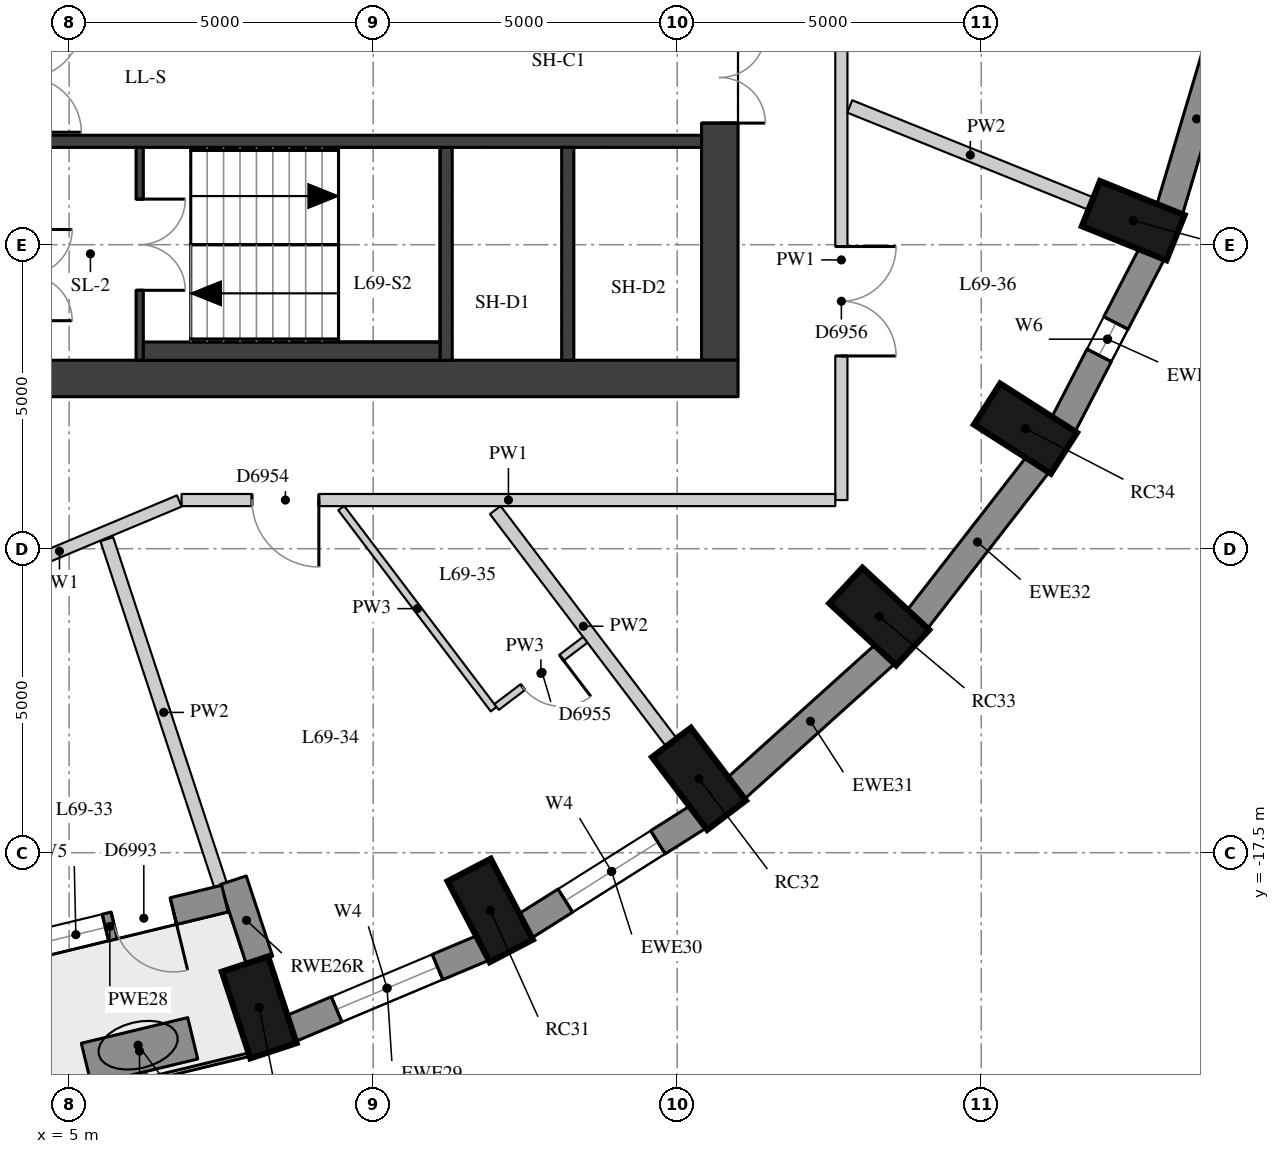
"""IFC4 building model, lengths in metres.
Left out: names, types, materials, properties, quantities, classifications, styles, units other than length and angle.
Written with IfcOpenShell. Run it as: python <this file> out.ifc"""

import sys

from ifc_helpers import new_model, si_unit, direction, frame, frame_2d, origin, origin_2d, place, context, subcontext, project, spatial, rectangle, extrude, element, fill, save


model = new_model("IFC4")
c1 = context("Model", 3, precision=1e-05, world=origin(), true_north=direction((0.0, 1.0)))
c2 = subcontext(c1, "Body", "Model", "MODEL_VIEW")
j1 = project(units=[si_unit("LENGTHUNIT", "METRE"), si_unit("PLANEANGLEUNIT", "RADIAN")], contexts=[c1])
p1 = place(None, origin())
s1 = spatial("IfcSite", under=j1, at=p1, CompositionType="ELEMENT")
p2 = place(p1, origin())
s2 = spatial("IfcBuilding", under=s1, at=p2, CompositionType="ELEMENT")
p3 = place(p2, frame((0.0, 0.0, 243.2)))
s3 = spatial("IfcBuildingStorey", under=s2, at=p3, CompositionType="ELEMENT", Elevation=243.2)
for number, where, z_axis, x_axis in (
    (1, (8.125, -20.044, 0.0), (0.0, 0.0, 1.0), (0.312, -0.95, 0.0)),
    (2, (11.925, -18.449, 0.0), (0.0, 0.0, 1.0), (0.462, -0.887, 0.0)),
    (3, (15.359, -16.285, 0.0), (0.0, 0.0, 1.0), (0.604, -0.797, 0.0)),
    (4, (18.323, -13.616, 0.0), (0.0, 0.0, 1.0), (0.733, -0.681, 0.0)),
    (5, (20.728, -10.525, 0.0), (0.0, 0.0, 1.0), (0.843, -0.539, 0.0)),
    (6, (22.5, -7.105, 0.0), (0.0, 0.0, 1.0), (0.928, -0.374, 0.0)),
):
    element("IfcColumn", number, at=place(p3, frame(where, z_axis=z_axis, x_axis=x_axis)), inside=s3, PredefinedType="COLUMN", context=c2, shape_type="SweptSolid", body=[
        extrude(rectangle(XDim=1.5, YDim=0.8, at=origin_2d()), origin(), (0.0, 0.0, 1.0), 3.3),
    ])
p4 = place(p3, frame((8.641, -20.395, 0.0), z_axis=(0.0, 0.0, 1.0), x_axis=(0.922049934692, 0.3870709469, 0.0)))
e7 = element("IfcWall", 7, at=p4, inside=s3, PredefinedType="SOLIDWALL", context=c2, shape_type="SweptSolid", body=[
    extrude(rectangle(XDim=3.443, YDim=0.45, at=frame_2d((1.722, 0.0))), origin(), (0.0, 0.0, 1.0), 3.02),
])
p5 = place(p4, frame((0.822, 0.0, 0.4)))
e8 = element("IfcOpeningElement", 8, at=p5, cuts=e7, PredefinedType="OPENING", context=c2, shape_type="SweptSolid", body=[
    extrude(rectangle(XDim=1.8, YDim=1.75, at=frame_2d((0.9, 0.875))), frame((0.0, 0.235, 0.0), z_axis=(0.0, -1.0, 0.0), x_axis=(1.0, 0.0, 0.0)), (0.0, 0.0, 1.0), 0.47),
])
p6 = place(p3, frame((12.49, -18.711, 0.0), z_axis=(0.0, 0.0, 1.0), x_axis=(0.845929139811, 0.53329531258, 0.0)))
e9 = element("IfcWall", 9, at=p6, inside=s3, PredefinedType="SOLIDWALL", context=c2, shape_type="SweptSolid", body=[
    extrude(rectangle(XDim=3.385, YDim=0.45, at=frame_2d((1.692, 0.0))), origin(), (0.0, 0.0, 1.0), 3.02),
])
p7 = place(p6, frame((0.792, 0.0, 0.4)))
e10 = element("IfcOpeningElement", 10, at=p7, cuts=e9, PredefinedType="OPENING", context=c2, shape_type="SweptSolid", body=[
    extrude(rectangle(XDim=1.8, YDim=1.75, at=frame_2d((0.9, 0.875))), frame((0.0, 0.235, 0.0), z_axis=(0.0, -1.0, 0.0), x_axis=(1.0, 0.0, 0.0)), (0.0, 0.0, 1.0), 0.47),
])
p8 = place(p3, frame((15.959, -16.448, 0.0), z_axis=(0.0, 0.0, 1.0), x_axis=(0.743166014219, 0.669107073128, 0.0)))
e11 = element("IfcWall", 11, at=p8, inside=s3, PredefinedType="SOLIDWALL", context=c2, shape_type="SweptSolid", body=[
    extrude(rectangle(XDim=3.316, YDim=0.45, at=frame_2d((1.658, 0.0))), origin(), (0.0, 0.0, 1.0), 3.02),
])
p9 = place(p3, frame((18.942, -13.672, 0.0), z_axis=(0.0, 0.0, 1.0), x_axis=(0.613898970825, 0.789384604372, 0.0)))
e12 = element("IfcWall", 12, at=p9, inside=s3, PredefinedType="SOLIDWALL", context=c2, shape_type="SweptSolid", body=[
    extrude(rectangle(XDim=3.247, YDim=0.45, at=frame_2d((1.624, 0.0))), origin(), (0.0, 0.0, 1.0), 3.02),
])
p10 = place(p3, frame((21.345, -10.468, 0.0), z_axis=(0.0, 0.0, 1.0), x_axis=(0.459921155255, 0.887959757505, 0.0)))
e13 = element("IfcWall", 13, at=p10, inside=s3, PredefinedType="SOLIDWALL", context=c2, shape_type="SweptSolid", body=[
    extrude(rectangle(XDim=3.186, YDim=0.45, at=frame_2d((1.593, 0.0))), origin(), (0.0, 0.0, 1.0), 3.02),
])
p11 = place(p10, frame((1.293, 0.0, 0.4)))
e14 = element("IfcOpeningElement", 14, at=p11, cuts=e13, PredefinedType="OPENING", context=c2, shape_type="SweptSolid", body=[
    extrude(rectangle(XDim=0.6, YDim=1.75, at=frame_2d((0.3, 0.875))), frame((0.0, 0.235, 0.0), z_axis=(0.0, -1.0, 0.0), x_axis=(1.0, 0.0, 0.0)), (0.0, 0.0, 1.0), 0.47),
])
p12 = place(p3, frame((23.094, -6.935, 0.0), z_axis=(0.0, 0.0, 1.0), x_axis=(0.285263800865, 0.958449040855, 0.0)))
e15 = element("IfcWall", 15, at=p12, inside=s3, PredefinedType="SOLIDWALL", context=c2, shape_type="SweptSolid", body=[
    extrude(rectangle(XDim=3.139, YDim=0.45, at=frame_2d((1.57, 0.0))), origin(), (0.0, 0.0, 1.0), 3.02),
])
p13 = place(p3, frame((8.134, -19.273, 0.0), z_axis=(0.0, 0.0, 1.0), x_axis=(-0.312379684595, 0.949957332017, 0.0)))
e16 = element("IfcWall", 16, at=p13, inside=s3, PredefinedType="SOLIDWALL", context=c2, shape_type="SweptSolid", body=[
    extrude(rectangle(XDim=1.39, YDim=0.45, at=frame_2d((0.695, 0.0))), origin(), (0.0, 0.0, 1.0), 3.02),
])
p14 = place(p3, frame((3.776, -19.171, 0.0), z_axis=(0.0, 0.0, 1.0), x_axis=(0.971940055516, 0.235228672751, 0.0)))
e17 = element("IfcWall", 17, at=p14, inside=s3, PredefinedType="SOLIDWALL", context=c2, shape_type="SweptSolid", body=[
    extrude(rectangle(XDim=3.895, YDim=0.45, at=frame_2d((1.948, 0.0))), origin(), (0.0, 0.0, 1.0), 3.02),
])
p15 = place(p14, frame((0.873, 0.0, 0.4)))
e18 = element("IfcOpeningElement", 18, at=p15, cuts=e17, PredefinedType="OPENING", context=c2, shape_type="SweptSolid", body=[
    extrude(rectangle(XDim=1.0, YDim=1.75, at=frame_2d((0.5, 0.875))), frame((0.0, 0.235, 0.0), z_axis=(0.0, -1.0, 0.0), x_axis=(1.0, 0.0, 0.0)), (0.0, 0.0, 1.0), 0.47),
])
p16 = place(p14, frame((2.023, 0.0, 0.0)))
e19 = element("IfcOpeningElement", 19, at=p16, cuts=e17, PredefinedType="OPENING", context=c2, shape_type="SweptSolid", body=[
    extrude(rectangle(XDim=1.0, YDim=2.15, at=frame_2d((0.5, 1.075))), frame((0.0, 0.235, 0.0), z_axis=(0.0, -1.0, 0.0), x_axis=(1.0, 0.0, 0.0)), (0.0, 0.0, 1.0), 0.47),
])
p17 = place(p3, frame((5.282, -20.975, 0.0), z_axis=(0.0, 0.0, 1.0), x_axis=(0.972112071369, 0.234516781275, 0.0)))
e20 = element("IfcWall", 20, at=p17, inside=s3, PredefinedType="USERDEFINED", context=c2, shape_type="SweptSolid", body=[
    extrude(rectangle(XDim=1.8, YDim=0.7, at=frame_2d((0.9, 0.0))), origin(), (0.0, 0.0, 1.0), 0.75),
])
p18 = place(p3, frame((15.7, -9.4, 0.0), z_axis=(0.0, 0.0, 1.0), x_axis=(0.0, 1.0, 0.0)))
e21 = element("IfcWall", 21, at=p18, inside=s3, PredefinedType="SHEAR", context=c2, shape_type="SweptSolid", body=[
    extrude(rectangle(XDim=18.8, YDim=0.6, at=frame_2d((9.4, 0.0))), origin(), (0.0, 0.0, 1.0), 3.02),
])
p19 = place(p18, frame((13.4, 0.0, 0.0)))
e22 = element("IfcOpeningElement", 22, at=p19, cuts=e21, PredefinedType="OPENING", context=c2, shape_type="SweptSolid", body=[
    extrude(rectangle(XDim=1.5, YDim=2.1, at=frame_2d((0.75, 1.05))), frame((0.0, 0.31, 0.0), z_axis=(0.0, -1.0, 0.0), x_axis=(1.0, 0.0, 0.0)), (0.0, 0.0, 1.0), 0.62),
])
p20 = place(p18, frame((3.9, 0.0, 0.0)))
e23 = element("IfcOpeningElement", 23, at=p20, cuts=e21, PredefinedType="OPENING", context=c2, shape_type="SweptSolid", body=[
    extrude(rectangle(XDim=1.5, YDim=2.1, at=frame_2d((0.75, 1.05))), frame((0.0, 0.31, 0.0), z_axis=(0.0, -1.0, 0.0), x_axis=(1.0, 0.0, 0.0)), (0.0, 0.0, 1.0), 0.62),
])
p21 = place(p3, frame((4.0, -9.7, 0.0), z_axis=(0.0, 0.0, 1.0), x_axis=(1.0, 0.0, 0.0)))
e24 = element("IfcWall", 24, at=p21, inside=s3, PredefinedType="SHEAR", context=c2, shape_type="SweptSolid", body=[
    extrude(rectangle(XDim=12.0, YDim=0.6, at=frame_2d((6.0, 0.0))), origin(), (0.0, 0.0, 1.0), 3.02),
])
p22 = place(p3, frame((4.6, -5.8, 0.0), z_axis=(0.0, 0.0, 1.0), x_axis=(1.0, 0.0, 0.0)))
e25 = element("IfcWall", 25, at=p22, inside=s3, PredefinedType="SHEAR", context=c2, shape_type="SweptSolid", body=[
    extrude(rectangle(XDim=10.8, YDim=0.2, at=frame_2d((5.4, 0.0))), origin(), (0.0, 0.0, 1.0), 3.02),
])
for number, where, z_axis, x_axis in (
    (26, (11.2, -9.4, 0.0), (0.0, 0.0, 1.0), (0.0, 1.0, 0.0)),
    (27, (13.2, -9.4, 0.0), (0.0, 0.0, 1.0), (0.0, 1.0, 0.0)),
):
    element("IfcWall", number, at=place(p3, frame(where, z_axis=z_axis, x_axis=x_axis)), inside=s3, PredefinedType="SHEAR", context=c2, shape_type="SweptSolid", body=[
        extrude(rectangle(XDim=3.5, YDim=0.2, at=frame_2d((1.75, 0.0))), origin(), (0.0, 0.0, 1.0), 3.02),
    ])
p23 = place(p3, frame((6.16, -9.4, 0.0), z_axis=(0.0, 0.0, 1.0), x_axis=(0.0, 1.0, 0.0)))
e28 = element("IfcWall", 28, at=p23, inside=s3, PredefinedType="SHEAR", context=c2, shape_type="SweptSolid", body=[
    extrude(rectangle(XDim=3.5, YDim=0.12, at=frame_2d((1.75, 0.0))), origin(), (0.0, 0.0, 1.0), 3.02),
])
p24 = place(p23, frame((1.15, 0.0, 0.0)))
e29 = element("IfcOpeningElement", 29, at=p24, cuts=e28, PredefinedType="OPENING", context=c2, shape_type="SweptSolid", body=[
    extrude(rectangle(XDim=1.5, YDim=2.1, at=frame_2d((0.75, 1.05))), frame((0.0, 0.07, 0.0), z_axis=(0.0, -1.0, 0.0), x_axis=(1.0, 0.0, 0.0)), (0.0, 0.0, 1.0), 0.14),
])
p25 = place(p3, frame((6.22, -9.25, 0.0), z_axis=(0.0, 0.0, 1.0), x_axis=(1.0, 0.0, 0.0)))
e30 = element("IfcWall", 30, at=p25, inside=s3, PredefinedType="PARTITIONING", context=c2, shape_type="SweptSolid", body=[
    extrude(rectangle(XDim=4.88, YDim=0.3, at=frame_2d((2.44, 0.0))), origin(), (0.0, 0.0, 1.0), 3.02),
])
p26 = place(p3, frame((17.7, -3.8, 0.0), z_axis=(0.0, 0.0, 1.0), x_axis=(0.0, -1.0, 0.0)))
e31 = element("IfcWall", 31, at=p26, inside=s3, PredefinedType="PARTITIONING", context=c2, shape_type="SweptSolid", body=[
    extrude(rectangle(XDim=7.9, YDim=0.2, at=frame_2d((3.95, 0.0))), origin(), (0.0, 0.0, 1.0), 3.02),
])
p27 = place(p26, frame((3.73, 0.0, 0.0)))
e32 = element("IfcOpeningElement", 32, at=p27, cuts=e31, PredefinedType="OPENING", context=c2, shape_type="SweptSolid", body=[
    extrude(rectangle(XDim=1.8, YDim=2.1, at=frame_2d((0.9, 1.05))), frame((0.0, 0.11, 0.0), z_axis=(0.0, -1.0, 0.0), x_axis=(1.0, 0.0, 0.0)), (0.0, 0.0, 1.0), 0.22),
])
p28 = place(p3, frame((17.6, -11.7, 0.0), z_axis=(0.0, 0.0, 1.0), x_axis=(-1.0, 0.0, 0.0)))
e33 = element("IfcWall", 33, at=p28, inside=s3, PredefinedType="PARTITIONING", context=c2, shape_type="SweptSolid", body=[
    extrude(rectangle(XDim=10.751, YDim=0.2, at=frame_2d((5.375, 0.0))), origin(), (0.0, 0.0, 1.0), 3.02),
])
p29 = place(p28, frame((8.493, 0.0, 0.0)))
e34 = element("IfcOpeningElement", 34, at=p29, cuts=e33, PredefinedType="OPENING", context=c2, shape_type="SweptSolid", body=[
    extrude(rectangle(XDim=1.1, YDim=2.1, at=frame_2d((0.55, 1.05))), frame((0.0, 0.11, 0.0), z_axis=(0.0, -1.0, 0.0), x_axis=(1.0, 0.0, 0.0)), (0.0, 0.0, 1.0), 0.22),
])
p30 = place(p3, frame((6.812, -11.716, 0.0), z_axis=(0.0, 0.0, 1.0), x_axis=(-0.922465594323, -0.386079301817, 0.0)))
e35 = element("IfcWall", 35, at=p30, inside=s3, PredefinedType="PARTITIONING", context=c2, shape_type="SweptSolid", body=[
    extrude(rectangle(XDim=4.273, YDim=0.2, at=frame_2d((2.137, 0.0))), origin(), (0.0, 0.0, 1.0), 3.02),
])
p31 = place(p30, frame((2.349, 0.0, 0.0)))
e36 = element("IfcOpeningElement", 36, at=p31, cuts=e35, PredefinedType="OPENING", context=c2, shape_type="SweptSolid", body=[
    extrude(rectangle(XDim=0.9, YDim=2.1, at=frame_2d((0.45, 1.05))), frame((0.0, 0.11, 0.0), z_axis=(0.0, -1.0, 0.0), x_axis=(1.0, 0.0, 0.0)), (0.0, 0.0, 1.0), 0.22),
])
p32 = place(p3, frame((7.492, -18.04, 0.0), z_axis=(0.0, 0.0, 1.0), x_axis=(-0.312328122622, 0.949974285873, 0.0)))
e37 = element("IfcWall", 37, at=p32, inside=s3, PredefinedType="PARTITIONING", context=c2, shape_type="SweptSolid", body=[
    extrude(rectangle(XDim=5.996, YDim=0.22, at=frame_2d((2.998, 0.0))), origin(), (0.0, 0.0, 1.0), 3.02),
])
p33 = place(p3, frame((14.906, -15.687, 0.0), z_axis=(0.0, 0.0, 1.0), x_axis=(-0.604046750172, 0.796948883936, 0.0)))
e38 = element("IfcWall", 38, at=p33, inside=s3, PredefinedType="PARTITIONING", context=c2, shape_type="SweptSolid", body=[
    extrude(rectangle(XDim=4.798, YDim=0.22, at=frame_2d((2.399, 0.0))), origin(), (0.0, 0.0, 1.0), 3.02),
])
p34 = place(p3, frame((21.804, -6.824, 0.0), z_axis=(0.0, 0.0, 1.0), x_axis=(-0.92753277681, 0.373741819902, 0.0)))
e39 = element("IfcWall", 39, at=p34, inside=s3, PredefinedType="PARTITIONING", context=c2, shape_type="SweptSolid", body=[
    extrude(rectangle(XDim=4.277, YDim=0.22, at=frame_2d((2.138, 0.0))), origin(), (0.0, 0.0, 1.0), 3.02),
])
p35 = place(p3, frame((9.474, -11.832, 0.0), z_axis=(0.0, 0.0, 1.0), x_axis=(0.604029811985, -0.796961721938, 0.0)))
e40 = element("IfcWall", 40, at=p35, inside=s3, PredefinedType="PARTITIONING", context=c2, shape_type="SweptSolid", body=[
    extrude(rectangle(XDim=4.151, YDim=0.12, at=frame_2d((2.075, 0.0))), origin(), (0.0, 0.0, 1.0), 3.02),
])
p36 = place(p3, frame((12.029, -15.104, 0.0), z_axis=(0.0, 0.0, 1.0), x_axis=(0.796883918959, 0.60413245212, 0.0)))
e41 = element("IfcWall", 41, at=p36, inside=s3, PredefinedType="PARTITIONING", context=c2, shape_type="SweptSolid", body=[
    extrude(rectangle(XDim=1.83, YDim=0.12, at=frame_2d((0.915, 0.0))), origin(), (0.0, 0.0, 1.0), 3.02),
])
p37 = place(p36, frame((0.54, 0.0, 0.0)))
e42 = element("IfcOpeningElement", 42, at=p37, cuts=e41, PredefinedType="OPENING", context=c2, shape_type="SweptSolid", body=[
    extrude(rectangle(XDim=0.8, YDim=2.1, at=frame_2d((0.4, 1.05))), frame((0.0, 0.07, 0.0), z_axis=(0.0, -1.0, 0.0), x_axis=(1.0, 0.0, 0.0)), (0.0, 0.0, 1.0), 0.14),
])
p38 = place(p5, origin())
e43 = element("IfcWindow", 43, at=p38, inside=s3, PartitioningType="SINGLE_PANEL", PredefinedType="WINDOW", context=c2, shape_type="SweptSolid", body=[
    extrude(rectangle(XDim=1.8, YDim=1.75, at=frame_2d((0.9, 0.875))), frame((0.0, 0.035, 0.0), z_axis=(0.0, -1.0, 0.0), x_axis=(1.0, 0.0, 0.0)), (0.0, 0.0, 1.0), 0.06),
])
fill(e8, e43)
p39 = place(p7, origin())
e44 = element("IfcWindow", 44, at=p39, inside=s3, PartitioningType="SINGLE_PANEL", PredefinedType="WINDOW", context=c2, shape_type="SweptSolid", body=[
    extrude(rectangle(XDim=1.8, YDim=1.75, at=frame_2d((0.9, 0.875))), frame((0.0, 0.035, 0.0), z_axis=(0.0, -1.0, 0.0), x_axis=(1.0, 0.0, 0.0)), (0.0, 0.0, 1.0), 0.06),
])
fill(e10, e44)
p40 = place(p11, origin())
e45 = element("IfcWindow", 45, at=p40, inside=s3, PartitioningType="SINGLE_PANEL", PredefinedType="WINDOW", context=c2, shape_type="SweptSolid", body=[
    extrude(rectangle(XDim=0.6, YDim=1.75, at=frame_2d((0.3, 0.875))), frame((0.0, 0.035, 0.0), z_axis=(0.0, -1.0, 0.0), x_axis=(1.0, 0.0, 0.0)), (0.0, 0.0, 1.0), 0.06),
])
fill(e14, e45)
p41 = place(p15, origin())
e46 = element("IfcWindow", 46, at=p41, inside=s3, PartitioningType="SINGLE_PANEL", PredefinedType="WINDOW", context=c2, shape_type="SweptSolid", body=[
    extrude(rectangle(XDim=1.0, YDim=1.75, at=frame_2d((0.5, 0.875))), frame((0.0, 0.035, 0.0), z_axis=(0.0, -1.0, 0.0), x_axis=(1.0, 0.0, 0.0)), (0.0, 0.0, 1.0), 0.06),
])
fill(e18, e46)
p42 = place(p16, frame((1.0, 0.0, 0.0), z_axis=(0.0, 0.0, 1.0), x_axis=(-1.0, 0.0, 0.0)))
e47 = element("IfcDoor", 47, at=p42, inside=s3, OperationType="SINGLE_SWING_LEFT", PredefinedType="DOOR", context=c2, shape_type="SweptSolid", body=[
    extrude(rectangle(XDim=1.0, YDim=2.15, at=frame_2d((0.5, 1.075))), frame((0.0, 0.075, 0.0), z_axis=(0.0, -1.0, 0.0), x_axis=(1.0, 0.0, 0.0)), (0.0, 0.0, 1.0), 0.05),
])
fill(e19, e47)
p43 = place(p20, origin())
e48 = element("IfcDoor", 48, at=p43, inside=s3, OperationType="DOUBLE_DOOR_SINGLE_SWING", PredefinedType="DOOR", context=c2, shape_type="SweptSolid", body=[
    extrude(rectangle(XDim=1.5, YDim=2.1, at=frame_2d((0.75, 1.05))), frame((0.0, 0.025, 0.0), z_axis=(0.0, -1.0, 0.0), x_axis=(1.0, 0.0, 0.0)), (0.0, 0.0, 1.0), 0.05),
])
fill(e23, e48)
p44 = place(p24, origin())
e49 = element("IfcDoor", 49, at=p44, inside=s3, OperationType="DOUBLE_DOOR_SINGLE_SWING", PredefinedType="DOOR", context=c2, shape_type="SweptSolid", body=[
    extrude(rectangle(XDim=1.5, YDim=2.1, at=frame_2d((0.75, 1.05))), frame((0.0, 0.025, 0.0), z_axis=(0.0, -1.0, 0.0), x_axis=(1.0, 0.0, 0.0)), (0.0, 0.0, 1.0), 0.05),
])
fill(e29, e49)
p45 = place(p29, origin())
e50 = element("IfcDoor", 50, at=p45, inside=s3, OperationType="SINGLE_SWING_LEFT", PredefinedType="DOOR", context=c2, shape_type="SweptSolid", body=[
    extrude(rectangle(XDim=1.1, YDim=2.1, at=frame_2d((0.55, 1.05))), frame((0.0, 0.025, 0.0), z_axis=(0.0, -1.0, 0.0), x_axis=(1.0, 0.0, 0.0)), (0.0, 0.0, 1.0), 0.05),
])
fill(e34, e50)
p46 = place(p37, origin())
e51 = element("IfcDoor", 51, at=p46, inside=s3, OperationType="SINGLE_SWING_LEFT", PredefinedType="DOOR", context=c2, shape_type="SweptSolid", body=[
    extrude(rectangle(XDim=0.8, YDim=2.1, at=frame_2d((0.4, 1.05))), frame((0.0, 0.025, 0.0), z_axis=(0.0, -1.0, 0.0), x_axis=(1.0, 0.0, 0.0)), (0.0, 0.0, 1.0), 0.05),
])
fill(e42, e51)
p47 = place(p27, origin())
e52 = element("IfcDoor", 52, at=p47, inside=s3, OperationType="DOUBLE_DOOR_SINGLE_SWING", PredefinedType="DOOR", context=c2, shape_type="SweptSolid", body=[
    extrude(rectangle(XDim=1.8, YDim=2.1, at=frame_2d((0.9, 1.05))), frame((0.0, 0.025, 0.0), z_axis=(0.0, -1.0, 0.0), x_axis=(1.0, 0.0, 0.0)), (0.0, 0.0, 1.0), 0.05),
])
fill(e32, e52)
save(model, sys.argv[1])
